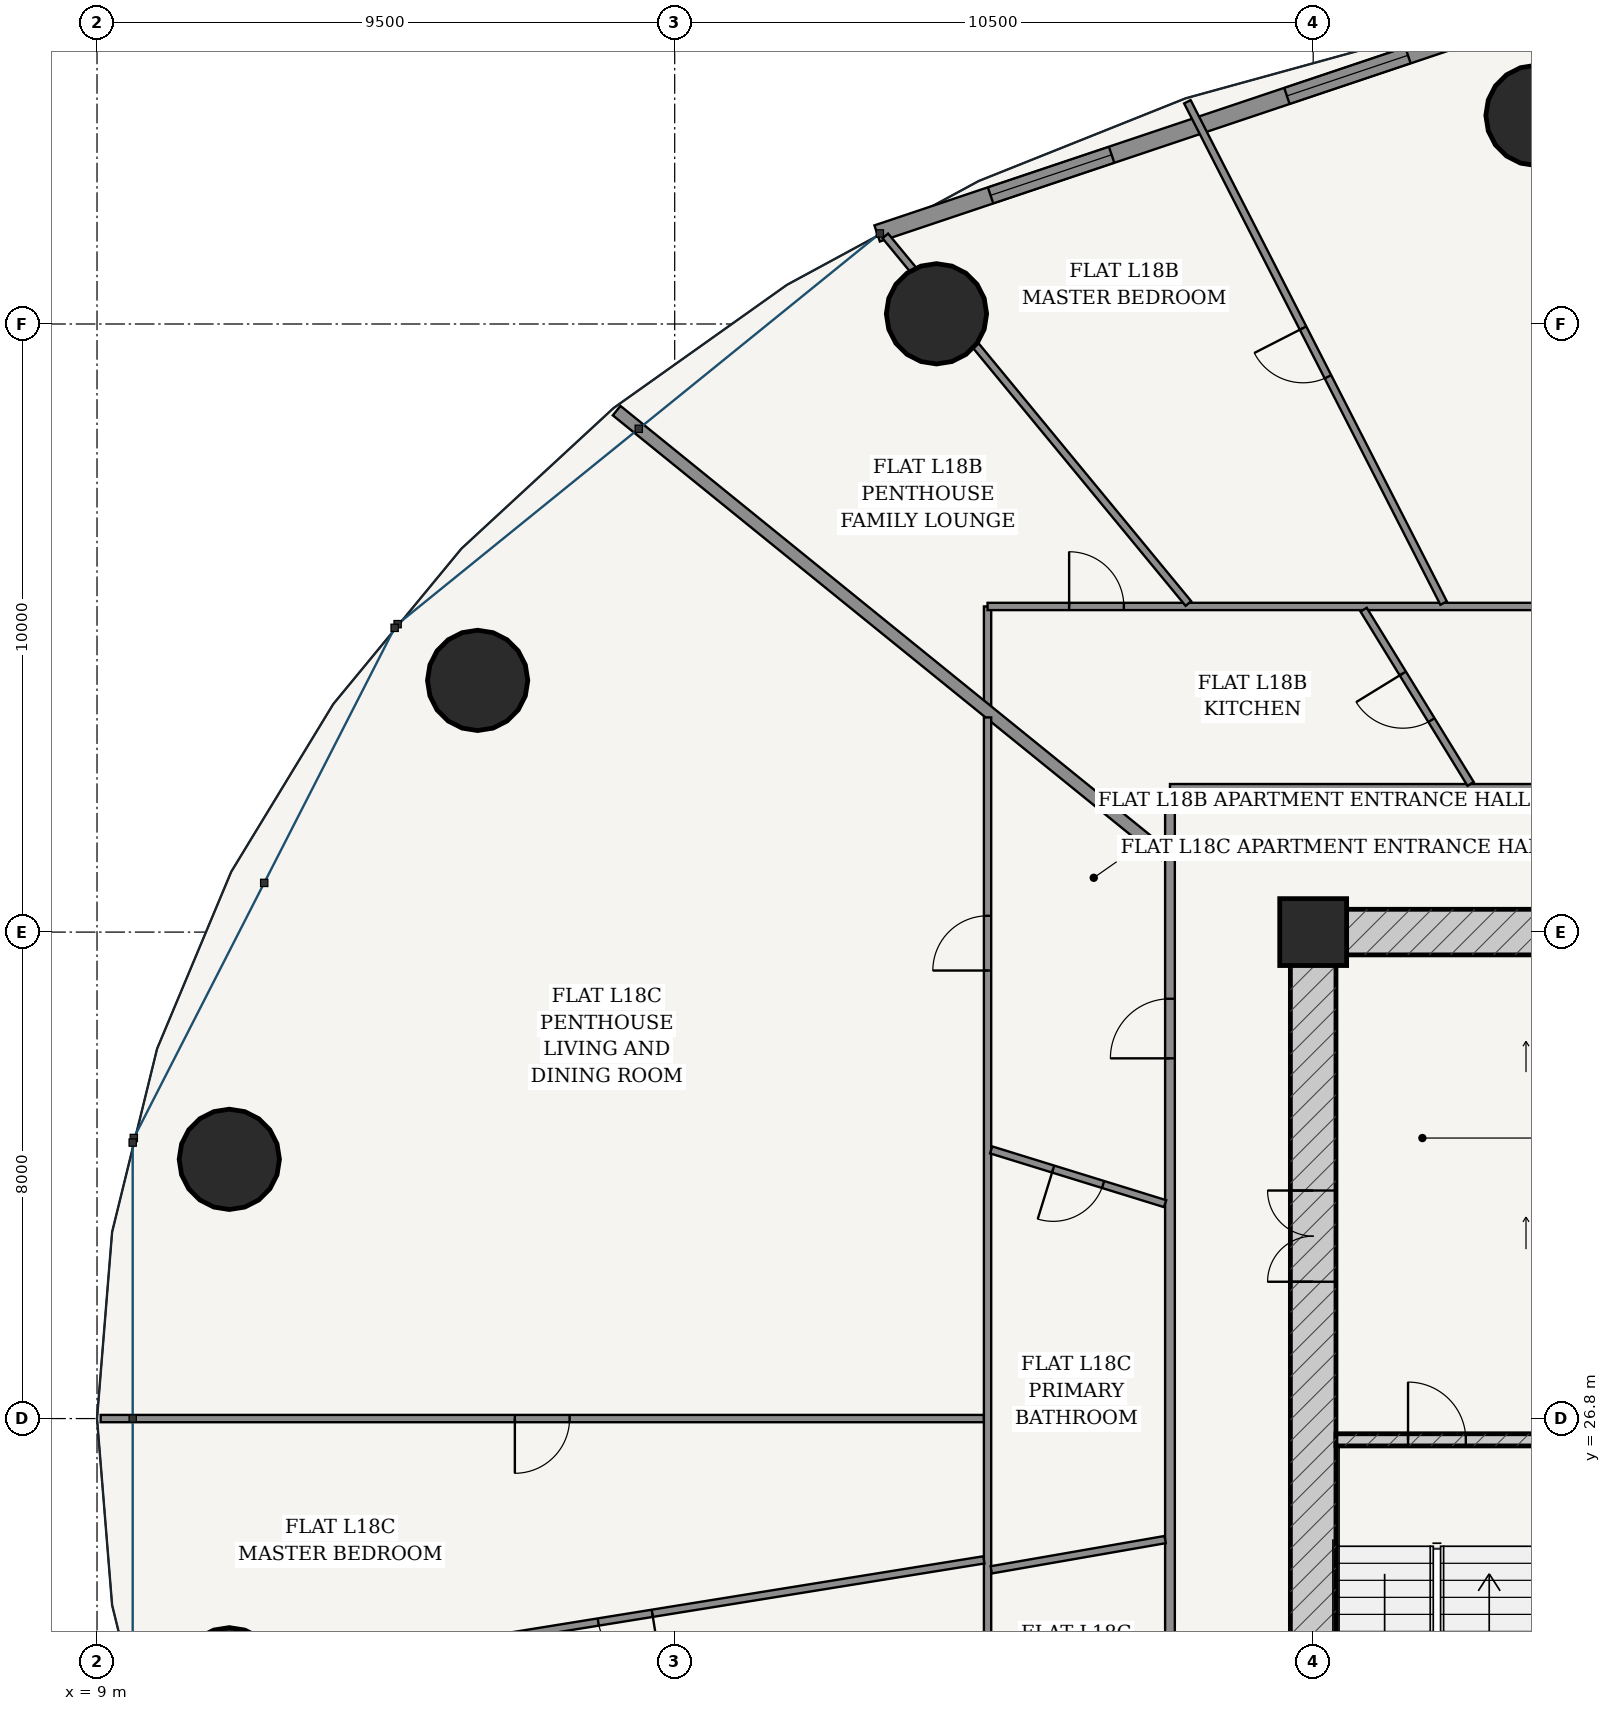
"""IFC4 building model, lengths in metres.
Left out: names, types, materials, properties, quantities, classifications, styles, units other than length and angle.
Written with IfcOpenShell. Run it as: python <this file> out.ifc"""

import sys

from ifc_helpers import new_model, si_unit, direction, frame, frame_2d, origin, origin_2d, place, context, subcontext, project, spatial, rectangle, hollow_circle, extrude, source, transform, mapped, element, fill, save


model = new_model("IFC4")
c1 = context("Model", 3, precision=1e-05, world=origin(), true_north=direction((-0.2419218956, 0.970295726276)))
c2 = subcontext(c1, "Body", "Model", "MODEL_VIEW")
j1 = project(units=[si_unit("LENGTHUNIT", "METRE"), si_unit("PLANEANGLEUNIT", "RADIAN")], contexts=[c1])
p1 = place(None, origin())
s1 = spatial("IfcSite", under=j1, at=p1, CompositionType="ELEMENT")
p2 = place(p1, origin())
s2 = spatial("IfcBuilding", under=s1, at=p2, CompositionType="ELEMENT")
p3 = place(p2, frame((0.0, 0.0, 70.8)))
s3 = spatial("IfcBuildingStorey", under=s2, at=p3, CompositionType="ELEMENT", Elevation=70.8)
p4 = place(p3, frame((29.0, 34.8, 0.0), z_axis=(0.0, 0.0, 1.0), x_axis=(1.0, 0.0, 0.0)))
e1 = element("IfcColumn", 1, at=p4, inside=s3, PredefinedType="COLUMN", context=c2, shape_type="SweptSolid", body=[
    extrude(rectangle(XDim=1.1, YDim=1.1, at=origin_2d()), origin(), (0.0, 0.0, 1.0), 3.6),
])
p5 = place(p3, frame((28.625, 34.8, 0.0), z_axis=(0.0, 0.0, 1.0), x_axis=(1.0, 0.0, 0.0)))
e2 = element("IfcWall", 2, at=p5, inside=s3, PredefinedType="SHEAR", context=c2, shape_type="SweptSolid", body=[
    extrude(rectangle(XDim=18.75, YDim=0.75, at=frame_2d((9.375, 0.0))), origin(), (0.0, 0.0, 1.0), 3.15),
])
p6 = place(p5, frame((7.407, 0.0, 0.0)))
e3 = element("IfcOpeningElement", 3, at=p6, cuts=e2, PredefinedType="OPENING", context=c2, shape_type="SweptSolid", body=[
    extrude(rectangle(XDim=0.86, YDim=2.1, at=frame_2d((0.43, 1.05))), frame((0.0, 0.385, 0.0), z_axis=(0.0, -1.0, 0.0), x_axis=(1.0, 0.0, 0.0)), (0.0, 0.0, 1.0), 0.77),
])
p7 = place(p5, frame((10.488, 0.0, 0.0)))
e4 = element("IfcOpeningElement", 4, at=p7, cuts=e2, PredefinedType="OPENING", context=c2, shape_type="SweptSolid", body=[
    extrude(rectangle(XDim=0.85, YDim=2.1, at=frame_2d((0.425, 1.05))), frame((0.0, 0.385, 0.0), z_axis=(0.0, -1.0, 0.0), x_axis=(1.0, 0.0, 0.0)), (0.0, 0.0, 1.0), 0.77),
])
p8 = place(p3, frame((29.0, 19.175, 0.0), z_axis=(0.0, 0.0, 1.0), x_axis=(0.0, 1.0, 0.0)))
e5 = element("IfcWall", 5, at=p8, inside=s3, PredefinedType="SHEAR", context=c2, shape_type="SweptSolid", body=[
    extrude(rectangle(XDim=15.25, YDim=0.75, at=frame_2d((7.625, 0.0))), origin(), (0.0, 0.0, 1.0), 3.15),
])
p9 = place(p8, frame((9.875, 0.0, 0.0)))
e6 = element("IfcOpeningElement", 6, at=p9, cuts=e5, PredefinedType="OPENING", context=c2, shape_type="SweptSolid", body=[
    extrude(rectangle(XDim=1.5, YDim=2.2, at=frame_2d((0.75, 1.1))), frame((0.0, 0.385, 0.0), z_axis=(0.0, -1.0, 0.0), x_axis=(1.0, 0.0, 0.0)), (0.0, 0.0, 1.0), 0.77),
])
p10 = place(p3, frame((29.375, 26.45, 0.0), z_axis=(0.0, 0.0, 1.0), x_axis=(1.0, 0.0, 0.0)))
e7 = element("IfcWall", 7, at=p10, inside=s3, PredefinedType="SOLIDWALL", context=c2, shape_type="SweptSolid", body=[
    extrude(rectangle(XDim=3.32, YDim=0.2, at=frame_2d((1.66, 0.0))), origin(), (0.0, 0.0, 1.0), 3.15),
])
p11 = place(p10, frame((1.185, 0.0, 0.0)))
e8 = element("IfcOpeningElement", 8, at=p11, cuts=e7, PredefinedType="OPENING", context=c2, shape_type="SweptSolid", body=[
    extrude(rectangle(XDim=0.95, YDim=2.15, at=frame_2d((0.475, 1.075))), frame((0.0, 0.11, 0.0), z_axis=(0.0, -1.0, 0.0), x_axis=(1.0, 0.0, 0.0)), (0.0, 0.0, 1.0), 0.22),
])
for number, where, z_axis, x_axis in (
    (9, (32.664, 48.23, 0.0), (0.0, 0.0, 1.0), (1.0, 0.0, 0.0)),
    (10, (22.805, 44.968, 0.0), (0.0, 0.0, 1.0), (1.0, 0.0, 0.0)),
    (11, (15.259, 38.939, 0.0), (0.0, 0.0, 1.0), (1.0, 0.0, 0.0)),
    (12, (11.176, 31.063, 0.0), (0.0, 0.0, 1.0), (1.0, 0.0, 0.0)),
    (13, (11.176, 22.537, 0.0), (0.0, 0.0, 1.0), (1.0, 0.0, 0.0)),
):
    element("IfcColumn", number, at=place(p3, frame(where, z_axis=z_axis, x_axis=x_axis)), inside=s3, PredefinedType="COLUMN", context=c2, shape_type="SweptSolid", body=[
        extrude(hollow_circle(Radius=0.825, WallThickness=0.05, at=origin_2d()), origin(), (0.0, 0.0, 1.0), 3.6),
    ])
p12 = place(p3, frame((32.424, 49.844, 0.0), z_axis=(0.0, 0.0, 1.0), x_axis=(-0.948041258496, -0.318147406385, 0.0)))
e14 = element("IfcWall", 14, at=p12, inside=s3, PredefinedType="SOLIDWALL", context=c2, shape_type="SweptSolid", body=[
    extrude(rectangle(XDim=11.175, YDim=0.28, at=frame_2d((5.588, 0.0))), origin(), (0.0, 0.0, 1.0), 3.15),
])
p13 = place(p12, frame((1.967, 0.0, 0.85)))
e15 = element("IfcOpeningElement", 15, at=p13, cuts=e14, PredefinedType="OPENING", context=c2, shape_type="SweptSolid", body=[
    extrude(rectangle(XDim=2.1, YDim=1.95, at=frame_2d((1.05, 0.975))), frame((0.0, 0.15, 0.0), z_axis=(0.0, -1.0, 0.0), x_axis=(1.0, 0.0, 0.0)), (0.0, 0.0, 1.0), 0.3),
])
p14 = place(p12, frame((7.108, 0.0, 0.85)))
e16 = element("IfcOpeningElement", 16, at=p14, cuts=e14, PredefinedType="OPENING", context=c2, shape_type="SweptSolid", body=[
    extrude(rectangle(XDim=2.1, YDim=1.95, at=frame_2d((1.05, 0.975))), frame((0.0, 0.15, 0.0), z_axis=(0.0, -1.0, 0.0), x_axis=(1.0, 0.0, 0.0)), (0.0, 0.0, 1.0), 0.3),
])
p15 = place(p3, frame((26.645, 37.155, 0.0), z_axis=(0.0, 0.0, 1.0), x_axis=(1.0, 0.0, 0.0)))
e17 = element("IfcWall", 17, at=p15, inside=s3, PredefinedType="PARTITIONING", context=c2, shape_type="SweptSolid", body=[
    extrude(rectangle(XDim=22.71, YDim=0.16, at=frame_2d((11.355, 0.0))), origin(), (0.0, 0.0, 1.0), 2.596),
])
p16 = place(p15, frame((7.859, 0.0, 0.0)))
e18 = element("IfcOpeningElement", 18, at=p16, cuts=e17, PredefinedType="OPENING", context=c2, shape_type="SweptSolid", body=[
    extrude(rectangle(XDim=0.98, YDim=2.2, at=frame_2d((0.49, 1.1))), frame((0.0, 0.09, 0.0), z_axis=(0.0, -1.0, 0.0), x_axis=(1.0, 0.0, 0.0)), (0.0, 0.0, 1.0), 0.18),
])
p17 = place(p3, frame((26.645, 16.525, 0.0), z_axis=(0.0, 0.0, 1.0), x_axis=(0.0, 1.0, 0.0)))
e19 = element("IfcWall", 19, at=p17, inside=s3, PredefinedType="PARTITIONING", context=c2, shape_type="SweptSolid", body=[
    extrude(rectangle(XDim=20.55, YDim=0.16, at=frame_2d((10.275, 0.0))), origin(), (0.0, 0.0, 1.0), 2.596),
])
p18 = place(p17, frame((16.199, 0.0, 0.0)))
e20 = element("IfcOpeningElement", 20, at=p18, cuts=e19, PredefinedType="OPENING", context=c2, shape_type="SweptSolid", body=[
    extrude(rectangle(XDim=0.98, YDim=2.2, at=frame_2d((0.49, 1.1))), frame((0.0, 0.09, 0.0), z_axis=(0.0, -1.0, 0.0), x_axis=(1.0, 0.0, 0.0)), (0.0, 0.0, 1.0), 0.18),
])
p19 = place(p3, frame((23.645, 38.534, 0.0), z_axis=(0.0, 0.0, 1.0), x_axis=(0.0, 1.0, 0.0)))
e21 = element("IfcWall", 21, at=p19, inside=s3, PredefinedType="PARTITIONING", context=c2, shape_type="SweptSolid", body=[
    extrude(rectangle(XDim=1.621, YDim=0.12, at=frame_2d((0.81, 0.0))), origin(), (0.0, 0.0, 1.0), 3.15),
])
p20 = place(p3, frame((23.645, 40.155, 0.0), z_axis=(0.0, 0.0, 1.0), x_axis=(1.0, 0.0, 0.0)))
e22 = element("IfcWall", 22, at=p20, inside=s3, PredefinedType="PARTITIONING", context=c2, shape_type="SweptSolid", body=[
    extrude(rectangle(XDim=21.08, YDim=0.12, at=frame_2d((10.54, 0.0))), origin(), (0.0, 0.0, 1.0), 2.596),
])
p21 = place(p20, frame((10.779, 0.0, 0.0)))
e23 = element("IfcOpeningElement", 23, at=p21, cuts=e22, PredefinedType="OPENING", context=c2, shape_type="SweptSolid", body=[
    extrude(rectangle(XDim=0.9, YDim=2.15, at=frame_2d((0.45, 1.075))), frame((0.0, 0.07, 0.0), z_axis=(0.0, -1.0, 0.0), x_axis=(1.0, 0.0, 0.0)), (0.0, 0.0, 1.0), 0.14),
])
p22 = place(p20, frame((1.342, 0.0, 0.0)))
e24 = element("IfcOpeningElement", 24, at=p22, cuts=e22, PredefinedType="OPENING", context=c2, shape_type="SweptSolid", body=[
    extrude(rectangle(XDim=0.9, YDim=2.15, at=frame_2d((0.45, 1.075))), frame((0.0, 0.07, 0.0), z_axis=(0.0, -1.0, 0.0), x_axis=(1.0, 0.0, 0.0)), (0.0, 0.0, 1.0), 0.14),
])
p23 = place(p3, frame((31.145, 40.21, 0.0), z_axis=(0.0, 0.0, 1.0), x_axis=(-0.455138005733, 0.89042090931, 0.0)))
e25 = element("IfcWall", 25, at=p23, inside=s3, PredefinedType="PARTITIONING", context=c2, shape_type="SweptSolid", body=[
    extrude(rectangle(XDim=9.259, YDim=0.12, at=frame_2d((4.629, 0.0))), origin(), (0.0, 0.0, 1.0), 2.666),
])
p24 = place(p23, frame((4.179, 0.0, 0.0)))
e26 = element("IfcOpeningElement", 26, at=p24, cuts=e25, PredefinedType="OPENING", context=c2, shape_type="SweptSolid", body=[
    extrude(rectangle(XDim=0.9, YDim=2.15, at=frame_2d((0.45, 1.075))), frame((0.0, 0.07, 0.0), z_axis=(0.0, -1.0, 0.0), x_axis=(1.0, 0.0, 0.0)), (0.0, 0.0, 1.0), 0.14),
])
p25 = place(p3, frame((26.948, 40.203, 0.0), z_axis=(0.0, 0.0, 1.0), x_axis=(-0.636191994442, 0.771530781115, 0.0)))
e27 = element("IfcWall", 27, at=p25, inside=s3, PredefinedType="PARTITIONING", context=c2, shape_type="SweptSolid", body=[
    extrude(rectangle(XDim=7.836, YDim=0.12, at=frame_2d((3.918, 0.0))), origin(), (0.0, 0.0, 1.0), 2.5),
])
p26 = place(p3, frame((31.589, 37.237, 0.0), z_axis=(0.0, 0.0, 1.0), x_axis=(-0.523404550994, 0.852084312729, 0.0)))
e28 = element("IfcWall", 28, at=p26, inside=s3, PredefinedType="PARTITIONING", context=c2, shape_type="SweptSolid", body=[
    extrude(rectangle(XDim=3.363, YDim=0.12, at=frame_2d((1.681, 0.0))), origin(), (0.0, 0.0, 1.0), 2.825),
])
p27 = place(p26, frame((1.231, 0.0, 0.0)))
e29 = element("IfcOpeningElement", 29, at=p27, cuts=e28, PredefinedType="OPENING", context=c2, shape_type="SweptSolid", body=[
    extrude(rectangle(XDim=0.9, YDim=2.15, at=frame_2d((0.45, 1.075))), frame((0.0, 0.07, 0.0), z_axis=(0.0, -1.0, 0.0), x_axis=(1.0, 0.0, 0.0)), (0.0, 0.0, 1.0), 0.14),
])
p28 = place(p3, frame((26.565, 36.066, 0.0), z_axis=(0.0, 0.0, 1.0), x_axis=(-0.77693672952, 0.629578683186, 0.0)))
e30 = element("IfcWall", 30, at=p28, inside=s3, PredefinedType="PARTITIONING", context=c2, shape_type="SweptSolid", body=[
    extrude(rectangle(XDim=11.609, YDim=0.2, at=frame_2d((5.805, 0.0))), origin(), (0.0, 0.0, 1.0), 2.666),
])
p29 = place(p3, frame((23.645, 19.129, 0.0), z_axis=(0.0, 0.0, 1.0), x_axis=(0.0, 1.0, 0.0)))
e31 = element("IfcWall", 31, at=p29, inside=s3, PredefinedType="PARTITIONING", context=c2, shape_type="SweptSolid", body=[
    extrude(rectangle(XDim=19.201, YDim=0.12, at=frame_2d((9.601, 0.0))), origin(), (0.0, 0.0, 1.0), 2.596),
])
p30 = place(p29, frame((15.038, 0.0, 0.0)))
e32 = element("IfcOpeningElement", 32, at=p30, cuts=e31, PredefinedType="OPENING", context=c2, shape_type="SweptSolid", body=[
    extrude(rectangle(XDim=0.9, YDim=2.15, at=frame_2d((0.45, 1.075))), frame((0.0, 0.07, 0.0), z_axis=(0.0, -1.0, 0.0), x_axis=(1.0, 0.0, 0.0)), (0.0, 0.0, 1.0), 0.14),
])
p31 = place(p29, frame((1.136, 0.0, 0.0)))
e33 = element("IfcOpeningElement", 33, at=p31, cuts=e31, PredefinedType="OPENING", context=c2, shape_type="SweptSolid", body=[
    extrude(rectangle(XDim=0.9, YDim=2.15, at=frame_2d((0.45, 1.075))), frame((0.0, 0.07, 0.0), z_axis=(0.0, -1.0, 0.0), x_axis=(1.0, 0.0, 0.0)), (0.0, 0.0, 1.0), 0.14),
])
p32 = place(p3, frame((23.583, 26.8, 0.0), z_axis=(0.0, 0.0, 1.0), x_axis=(-1.0, 0.0, 0.0)))
e34 = element("IfcWall", 34, at=p32, inside=s3, PredefinedType="PARTITIONING", context=c2, shape_type="SweptSolid", body=[
    extrude(rectangle(XDim=14.523, YDim=0.12, at=frame_2d((7.261, 0.0))), origin(), (0.0, 0.0, 1.0), 2.666),
])
p33 = place(p32, frame((6.812, 0.0, 0.0)))
e35 = element("IfcOpeningElement", 35, at=p33, cuts=e34, PredefinedType="OPENING", context=c2, shape_type="SweptSolid", body=[
    extrude(rectangle(XDim=0.9, YDim=2.15, at=frame_2d((0.45, 1.075))), frame((0.0, 0.07, 0.0), z_axis=(0.0, -1.0, 0.0), x_axis=(1.0, 0.0, 0.0)), (0.0, 0.0, 1.0), 0.14),
])
p34 = place(p3, frame((23.584, 24.476, 0.0), z_axis=(0.0, 0.0, 1.0), x_axis=(-0.987257727093, -0.159129445092, 0.0)))
e36 = element("IfcWall", 36, at=p34, inside=s3, PredefinedType="PARTITIONING", context=c2, shape_type="SweptSolid", body=[
    extrude(rectangle(XDim=14.086, YDim=0.12, at=frame_2d((7.043, 0.0))), origin(), (0.0, 0.0, 1.0), 2.5),
])
p35 = place(p34, frame((5.523, 0.0, 0.0)))
e37 = element("IfcOpeningElement", 37, at=p35, cuts=e36, PredefinedType="OPENING", context=c2, shape_type="SweptSolid", body=[
    extrude(rectangle(XDim=0.9, YDim=2.15, at=frame_2d((0.45, 1.075))), frame((0.0, 0.07, 0.0), z_axis=(0.0, -1.0, 0.0), x_axis=(1.0, 0.0, 0.0)), (0.0, 0.0, 1.0), 0.14),
])
p36 = place(p3, frame((26.565, 30.334, 0.0), z_axis=(0.0, 0.0, 1.0), x_axis=(-0.955416861585, 0.295260259093, 0.0)))
e38 = element("IfcWall", 38, at=p36, inside=s3, PredefinedType="PARTITIONING", context=c2, shape_type="SweptSolid", body=[
    extrude(rectangle(XDim=2.994, YDim=0.12, at=frame_2d((1.497, 0.0))), origin(), (0.0, 0.0, 1.0), 3.15),
])
p37 = place(p36, frame((1.067, 0.0, 0.0)))
e39 = element("IfcOpeningElement", 39, at=p37, cuts=e38, PredefinedType="OPENING", context=c2, shape_type="SweptSolid", body=[
    extrude(rectangle(XDim=0.86, YDim=2.15, at=frame_2d((0.43, 1.075))), frame((0.0, 0.07, 0.0), z_axis=(0.0, -1.0, 0.0), x_axis=(1.0, 0.0, 0.0)), (0.0, 0.0, 1.0), 0.14),
])
p38 = place(p3, frame((26.565, 24.81, 0.0), z_axis=(0.0, 0.0, 1.0), x_axis=(-0.985190752909, -0.171461891924, 0.0)))
e40 = element("IfcWall", 40, at=p38, inside=s3, PredefinedType="PARTITIONING", context=c2, shape_type="SweptSolid", body=[
    extrude(rectangle(XDim=2.902, YDim=0.12, at=frame_2d((1.451, 0.0))), origin(), (0.0, 0.0, 1.0), 2.596),
])
m1 = source(origin(), c2, "Body", "SweptSolid", [
    extrude(rectangle(XDim=2.1, YDim=1.95, at=frame_2d((1.05, 0.975))), frame((0.0, 0.03, 0.0), z_axis=(0.0, -1.0, 0.0), x_axis=(1.0, 0.0, 0.0)), (0.0, 0.0, 1.0), 0.06),
])
p39 = place(p13, origin())
e41 = element("IfcWindow", 41, at=p39, inside=s3, PartitioningType="SINGLE_PANEL", PredefinedType="WINDOW", context=c2, shape_type="MappedRepresentation", body=[
    mapped(m1, transform((0.0, 0.0, 0.0), scale=1.0)),
])
fill(e15, e41)
p40 = place(p14, origin())
e42 = element("IfcWindow", 42, at=p40, inside=s3, PartitioningType="SINGLE_PANEL", PredefinedType="WINDOW", context=c2, shape_type="MappedRepresentation", body=[
    mapped(m1, transform((0.0, 0.0, 0.0), scale=1.0)),
])
fill(e16, e42)
m2 = source(origin(), c2, "Body", "SweptSolid", [
    extrude(rectangle(XDim=1.5, YDim=2.2, at=frame_2d((0.75, 1.1))), frame((0.0, 0.025, 0.0), z_axis=(0.0, -1.0, 0.0), x_axis=(1.0, 0.0, 0.0)), (0.0, 0.0, 1.0), 0.05),
])
p41 = place(p9, origin())
e43 = element("IfcDoor", 43, at=p41, inside=s3, OperationType="DOUBLE_DOOR_SINGLE_SWING", PredefinedType="DOOR", context=c2, shape_type="MappedRepresentation", body=[
    mapped(m2, transform((0.0, 0.0, 0.0), scale=1.0)),
])
fill(e6, e43)
m3 = source(origin(), c2, "Body", "SweptSolid", [
    extrude(rectangle(XDim=0.95, YDim=2.15, at=frame_2d((0.475, 1.075))), frame((0.0, 0.025, 0.0), z_axis=(0.0, -1.0, 0.0), x_axis=(1.0, 0.0, 0.0)), (0.0, 0.0, 1.0), 0.05),
])
p42 = place(p11, origin())
e44 = element("IfcDoor", 44, at=p42, inside=s3, OperationType="SINGLE_SWING_LEFT", PredefinedType="DOOR", context=c2, shape_type="MappedRepresentation", body=[
    mapped(m3, transform((0.0, 0.0, 0.0), scale=1.0)),
])
fill(e8, e44)
m4 = source(origin(), c2, "Body", "SweptSolid", [
    extrude(rectangle(XDim=0.9, YDim=2.15, at=frame_2d((0.45, 1.075))), frame((0.0, 0.025, 0.0), z_axis=(0.0, -1.0, 0.0), x_axis=(1.0, 0.0, 0.0)), (0.0, 0.0, 1.0), 0.05),
])
p43 = place(p27, origin())
e45 = element("IfcDoor", 45, at=p43, inside=s3, OperationType="SINGLE_SWING_RIGHT", PredefinedType="DOOR", context=c2, shape_type="MappedRepresentation", body=[
    mapped(m4, transform((0.0, 0.0, 0.0), scale=1.0)),
])
fill(e29, e45)
p44 = place(p22, origin())
e46 = element("IfcDoor", 46, at=p44, inside=s3, OperationType="SINGLE_SWING_LEFT", PredefinedType="DOOR", context=c2, shape_type="MappedRepresentation", body=[
    mapped(m4, transform((0.0, 0.0, 0.0), scale=1.0)),
])
fill(e24, e46)
p45 = place(p24, origin())
e47 = element("IfcDoor", 47, at=p45, inside=s3, OperationType="SINGLE_SWING_RIGHT", PredefinedType="DOOR", context=c2, shape_type="MappedRepresentation", body=[
    mapped(m4, transform((0.0, 0.0, 0.0), scale=1.0)),
])
fill(e26, e47)
m5 = source(origin(), c2, "Body", "SweptSolid", [
    extrude(rectangle(XDim=0.98, YDim=2.2, at=frame_2d((0.49, 1.1))), frame((0.0, 0.025, 0.0), z_axis=(0.0, -1.0, 0.0), x_axis=(1.0, 0.0, 0.0)), (0.0, 0.0, 1.0), 0.05),
])
p46 = place(p18, origin())
e48 = element("IfcDoor", 48, at=p46, inside=s3, OperationType="SINGLE_SWING_LEFT", PredefinedType="DOOR", context=c2, shape_type="MappedRepresentation", body=[
    mapped(m5, transform((0.0, 0.0, 0.0), scale=1.0)),
])
fill(e20, e48)
m6 = source(origin(), c2, "Body", "SweptSolid", [
    extrude(rectangle(XDim=0.86, YDim=2.15, at=frame_2d((0.43, 1.075))), frame((0.0, 0.025, 0.0), z_axis=(0.0, -1.0, 0.0), x_axis=(1.0, 0.0, 0.0)), (0.0, 0.0, 1.0), 0.05),
])
p47 = place(p37, origin())
e49 = element("IfcDoor", 49, at=p47, inside=s3, OperationType="SINGLE_SWING_RIGHT", PredefinedType="DOOR", context=c2, shape_type="MappedRepresentation", body=[
    mapped(m6, transform((0.0, 0.0, 0.0), scale=1.0)),
])
fill(e39, e49)
p48 = place(p30, origin())
e50 = element("IfcDoor", 50, at=p48, inside=s3, OperationType="SINGLE_SWING_LEFT", PredefinedType="DOOR", context=c2, shape_type="MappedRepresentation", body=[
    mapped(m4, transform((0.0, 0.0, 0.0), scale=1.0)),
])
fill(e32, e50)
p49 = place(p33, origin())
e51 = element("IfcDoor", 51, at=p49, inside=s3, OperationType="SINGLE_SWING_RIGHT", PredefinedType="DOOR", context=c2, shape_type="MappedRepresentation", body=[
    mapped(m4, transform((0.0, 0.0, 0.0), scale=1.0)),
])
fill(e35, e51)
p50 = place(p35, origin())
e52 = element("IfcDoor", 52, at=p50, inside=s3, OperationType="SINGLE_SWING_LEFT", PredefinedType="DOOR", context=c2, shape_type="MappedRepresentation", body=[
    mapped(m4, transform((0.0, 0.0, 0.0), scale=1.0)),
])
fill(e37, e52)
save(model, sys.argv[1])
